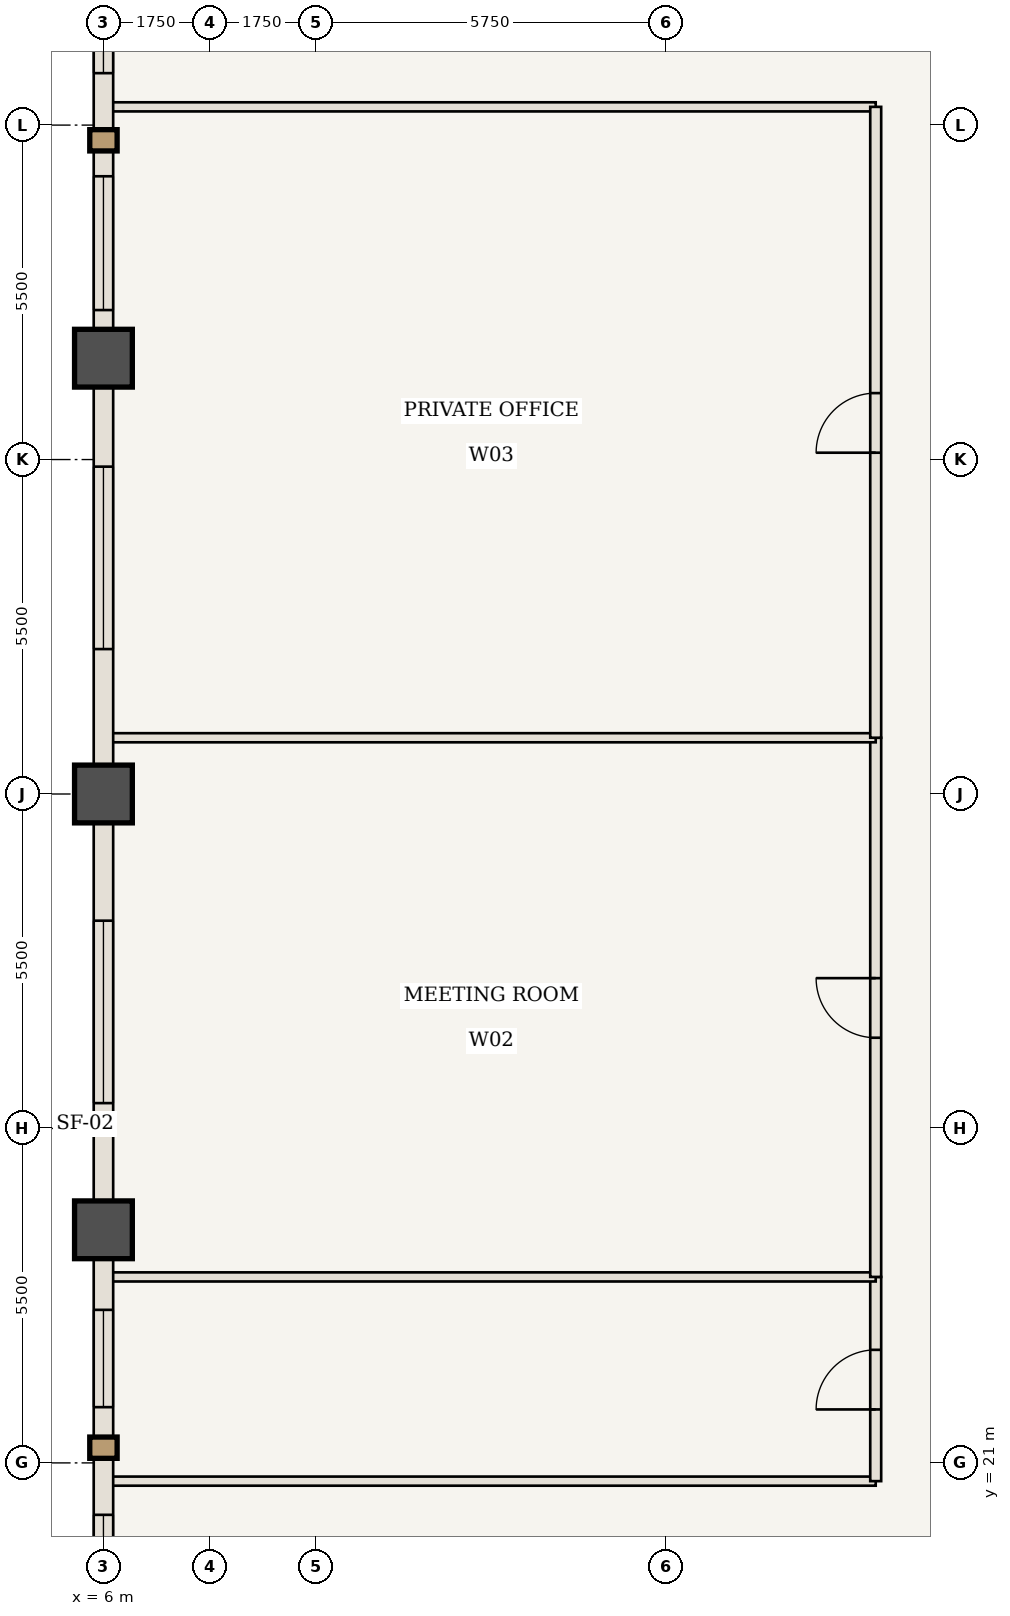
"""IFC4 building model, lengths in metres.
Left out: names, types, materials, properties, quantities, classifications, styles, units other than length and angle.
Written with IfcOpenShell. Run it as: python <this file> out.ifc"""

import sys

from ifc_helpers import new_model, si_unit, direction, frame, frame_2d, origin, origin_2d, place, context, subcontext, project, spatial, rectangle, extrude, element, fill, save


model = new_model("IFC4")
c1 = context("Model", 3, precision=1e-05, world=origin(), true_north=direction((0.0, 1.0)))
c2 = subcontext(c1, "Body", "Model", "MODEL_VIEW")
j1 = project(units=[si_unit("LENGTHUNIT", "METRE"), si_unit("PLANEANGLEUNIT", "RADIAN")], contexts=[c1])
p1 = place(None, origin())
s1 = spatial("IfcSite", under=j1, at=p1, CompositionType="ELEMENT")
p2 = place(p1, origin())
s2 = spatial("IfcBuilding", under=s1, at=p2, CompositionType="ELEMENT")
p3 = place(p2, frame((0.0, 0.0, 141.4)))
s3 = spatial("IfcBuildingStorey", under=s2, at=p3, CompositionType="ELEMENT", Elevation=141.4)
for number, where, z_axis, x_axis in (
    (1, (6.0, 24.833, 0.0), (0.0, 0.0, 1.0), (1.0, 0.0, 0.0)),
    (2, (6.0, 32.0, 0.0), (0.0, 0.0, 1.0), (1.0, 0.0, 0.0)),
    (3, (6.0, 39.167, 0.0), (0.0, 0.0, 1.0), (1.0, 0.0, 0.0)),
):
    element("IfcColumn", number, at=place(p3, frame(where, z_axis=z_axis, x_axis=x_axis)), inside=s3, PredefinedType="COLUMN", context=c2, shape_type="SweptSolid", body=[
        extrude(rectangle(XDim=0.95, YDim=0.95, at=origin_2d()), origin(), (0.0, 0.0, 1.0), 3.85),
    ])
for number, where, z_axis, x_axis in (
    (4, (6.06, 20.7, 0.0), (0.0, 0.0, 1.0), (1.0, 0.0, 0.0)),
    (5, (6.06, 43.3, 0.0), (0.0, 0.0, 1.0), (1.0, 0.0, 0.0)),
):
    element("IfcWall", number, at=place(p3, frame(where, z_axis=z_axis, x_axis=x_axis)), inside=s3, PredefinedType="STANDARD", context=c2, shape_type="SweptSolid", body=[
        extrude(rectangle(XDim=12.64, YDim=0.15, at=frame_2d((6.32, 0.0))), origin(), (0.0, 0.0, 1.0), 3.065),
    ])
p4 = place(p3, frame((18.7, 20.7, 0.0), z_axis=(0.0, 0.0, 1.0), x_axis=(0.0, 1.0, 0.0)))
e6 = element("IfcWall", 6, at=p4, inside=s3, PredefinedType="STANDARD", context=c2, shape_type="SweptSolid", body=[
    extrude(rectangle(XDim=3.358, YDim=0.18, at=frame_2d((1.679, 0.0))), origin(), (0.0, 0.0, 1.0), 3.685),
])
p5 = place(p4, frame((1.179, 0.0, 0.0)))
e7 = element("IfcOpeningElement", 7, at=p5, cuts=e6, PredefinedType="OPENING", context=c2, shape_type="SweptSolid", body=[
    extrude(rectangle(XDim=0.98, YDim=2.2, at=frame_2d((0.49, 1.1))), frame((0.0, 0.1, 0.0), z_axis=(0.0, -1.0, 0.0), x_axis=(1.0, 0.0, 0.0)), (0.0, 0.0, 1.0), 0.2),
])
p6 = place(p3, frame((6.06, 24.058, 0.0), z_axis=(0.0, 0.0, 1.0), x_axis=(1.0, 0.0, 0.0)))
e8 = element("IfcWall", 8, at=p6, inside=s3, PredefinedType="STANDARD", context=c2, shape_type="SweptSolid", body=[
    extrude(rectangle(XDim=12.64, YDim=0.15, at=frame_2d((6.32, 0.0))), origin(), (0.0, 0.0, 1.0), 3.685),
])
p7 = place(p3, frame((18.7, 24.058, 0.0), z_axis=(0.0, 0.0, 1.0), x_axis=(0.0, 1.0, 0.0)))
e9 = element("IfcWall", 9, at=p7, inside=s3, PredefinedType="STANDARD", context=c2, shape_type="SweptSolid", body=[
    extrude(rectangle(XDim=8.867, YDim=0.18, at=frame_2d((4.433, 0.0))), origin(), (0.0, 0.0, 1.0), 3.685),
])
p8 = place(p7, frame((3.933, 0.0, 0.0)))
e10 = element("IfcOpeningElement", 10, at=p8, cuts=e9, PredefinedType="OPENING", context=c2, shape_type="SweptSolid", body=[
    extrude(rectangle(XDim=0.98, YDim=2.2, at=frame_2d((0.49, 1.1))), frame((0.0, 0.1, 0.0), z_axis=(0.0, -1.0, 0.0), x_axis=(1.0, 0.0, 0.0)), (0.0, 0.0, 1.0), 0.2),
])
p9 = place(p3, frame((6.06, 32.925, 0.0), z_axis=(0.0, 0.0, 1.0), x_axis=(1.0, 0.0, 0.0)))
e11 = element("IfcWall", 11, at=p9, inside=s3, PredefinedType="STANDARD", context=c2, shape_type="SweptSolid", body=[
    extrude(rectangle(XDim=12.64, YDim=0.15, at=frame_2d((6.32, 0.0))), origin(), (0.0, 0.0, 1.0), 3.685),
])
p10 = place(p3, frame((18.7, 32.925, 0.0), z_axis=(0.0, 0.0, 1.0), x_axis=(0.0, 1.0, 0.0)))
e12 = element("IfcWall", 12, at=p10, inside=s3, PredefinedType="STANDARD", context=c2, shape_type="SweptSolid", body=[
    extrude(rectangle(XDim=10.375, YDim=0.18, at=frame_2d((5.188, 0.0))), origin(), (0.0, 0.0, 1.0), 3.685),
])
p11 = place(p10, frame((4.688, 0.0, 0.0)))
e13 = element("IfcOpeningElement", 13, at=p11, cuts=e12, PredefinedType="OPENING", context=c2, shape_type="SweptSolid", body=[
    extrude(rectangle(XDim=0.98, YDim=2.2, at=frame_2d((0.49, 1.1))), frame((0.0, 0.1, 0.0), z_axis=(0.0, -1.0, 0.0), x_axis=(1.0, 0.0, 0.0)), (0.0, 0.0, 1.0), 0.2),
])
p12 = place(p3, frame((6.0, 17.667, 0.0), z_axis=(0.0, 0.0, 1.0), x_axis=(0.0, 1.0, 0.0)))
e14 = element("IfcWall", 14, at=p12, inside=s3, PredefinedType="USERDEFINED", context=c2, shape_type="SweptSolid", body=[
    extrude(rectangle(XDim=7.167, YDim=0.32, at=frame_2d((3.583, 0.0))), origin(), (0.0, 0.0, 1.0), 2.885),
])
p13 = place(p12, frame((0.879, 0.0, 0.85)))
e15 = element("IfcOpeningElement", 15, at=p13, cuts=e14, PredefinedType="OPENING", context=c2, shape_type="SweptSolid", body=[
    extrude(rectangle(XDim=1.6, YDim=1.835, at=frame_2d((0.8, 0.917))), frame((0.0, 0.17, 0.0), z_axis=(0.0, -1.0, 0.0), x_axis=(1.0, 0.0, 0.0)), (0.0, 0.0, 1.0), 0.34),
])
p14 = place(p12, frame((4.25, 0.0, 0.85)))
e16 = element("IfcOpeningElement", 16, at=p14, cuts=e14, PredefinedType="OPENING", context=c2, shape_type="SweptSolid", body=[
    extrude(rectangle(XDim=1.6, YDim=1.835, at=frame_2d((0.8, 0.917))), frame((0.0, 0.17, 0.0), z_axis=(0.0, -1.0, 0.0), x_axis=(1.0, 0.0, 0.0)), (0.0, 0.0, 1.0), 0.34),
])
p15 = place(p3, frame((6.0, 24.833, 0.0), z_axis=(0.0, 0.0, 1.0), x_axis=(0.0, 1.0, 0.0)))
e17 = element("IfcWall", 17, at=p15, inside=s3, PredefinedType="USERDEFINED", context=c2, shape_type="SweptSolid", body=[
    extrude(rectangle(XDim=7.167, YDim=0.32, at=frame_2d((3.583, 0.0))), origin(), (0.0, 0.0, 1.0), 2.885),
])
p16 = place(p15, frame((2.083, 0.0, 0.85)))
e18 = element("IfcOpeningElement", 18, at=p16, cuts=e17, PredefinedType="OPENING", context=c2, shape_type="SweptSolid", body=[
    extrude(rectangle(XDim=3.0, YDim=1.835, at=frame_2d((1.5, 0.917))), frame((0.0, 0.17, 0.0), z_axis=(0.0, -1.0, 0.0), x_axis=(1.0, 0.0, 0.0)), (0.0, 0.0, 1.0), 0.34),
])
p17 = place(p3, frame((6.0, 32.0, 0.0), z_axis=(0.0, 0.0, 1.0), x_axis=(0.0, 1.0, 0.0)))
e19 = element("IfcWall", 19, at=p17, inside=s3, PredefinedType="USERDEFINED", context=c2, shape_type="SweptSolid", body=[
    extrude(rectangle(XDim=7.167, YDim=0.32, at=frame_2d((3.583, 0.0))), origin(), (0.0, 0.0, 1.0), 2.885),
])
p18 = place(p17, frame((2.383, 0.0, 0.85)))
e20 = element("IfcOpeningElement", 20, at=p18, cuts=e19, PredefinedType="OPENING", context=c2, shape_type="SweptSolid", body=[
    extrude(rectangle(XDim=3.0, YDim=1.835, at=frame_2d((1.5, 0.917))), frame((0.0, 0.17, 0.0), z_axis=(0.0, -1.0, 0.0), x_axis=(1.0, 0.0, 0.0)), (0.0, 0.0, 1.0), 0.34),
])
p19 = place(p3, frame((6.0, 39.167, 0.0), z_axis=(0.0, 0.0, 1.0), x_axis=(0.0, 1.0, 0.0)))
e21 = element("IfcWall", 21, at=p19, inside=s3, PredefinedType="USERDEFINED", context=c2, shape_type="SweptSolid", body=[
    extrude(rectangle(XDim=7.167, YDim=0.32, at=frame_2d((3.583, 0.0))), origin(), (0.0, 0.0, 1.0), 2.885),
])
p20 = place(p19, frame((0.792, 0.0, 0.85)))
e22 = element("IfcOpeningElement", 22, at=p20, cuts=e21, PredefinedType="OPENING", context=c2, shape_type="SweptSolid", body=[
    extrude(rectangle(XDim=2.2, YDim=1.835, at=frame_2d((1.1, 0.917))), frame((0.0, 0.17, 0.0), z_axis=(0.0, -1.0, 0.0), x_axis=(1.0, 0.0, 0.0)), (0.0, 0.0, 1.0), 0.34),
])
p21 = place(p19, frame((4.688, 0.0, 0.85)))
e23 = element("IfcOpeningElement", 23, at=p21, cuts=e21, PredefinedType="OPENING", context=c2, shape_type="SweptSolid", body=[
    extrude(rectangle(XDim=1.6, YDim=1.835, at=frame_2d((0.8, 0.917))), frame((0.0, 0.17, 0.0), z_axis=(0.0, -1.0, 0.0), x_axis=(1.0, 0.0, 0.0)), (0.0, 0.0, 1.0), 0.34),
])
p22 = place(p5, origin())
e24 = element("IfcDoor", 24, at=p22, inside=s3, OperationType="SINGLE_SWING_LEFT", PredefinedType="DOOR", context=c2, shape_type="SweptSolid", body=[
    extrude(rectangle(XDim=0.98, YDim=2.2, at=frame_2d((0.49, 1.1))), frame((0.0, 0.025, 0.0), z_axis=(0.0, -1.0, 0.0), x_axis=(1.0, 0.0, 0.0)), (0.0, 0.0, 1.0), 0.05),
])
fill(e7, e24)
p23 = place(p8, origin())
e25 = element("IfcDoor", 25, at=p23, inside=s3, OperationType="SINGLE_SWING_RIGHT", PredefinedType="DOOR", context=c2, shape_type="SweptSolid", body=[
    extrude(rectangle(XDim=0.98, YDim=2.2, at=frame_2d((0.49, 1.1))), frame((0.0, 0.025, 0.0), z_axis=(0.0, -1.0, 0.0), x_axis=(1.0, 0.0, 0.0)), (0.0, 0.0, 1.0), 0.05),
])
fill(e10, e25)
p24 = place(p11, origin())
e26 = element("IfcDoor", 26, at=p24, inside=s3, OperationType="SINGLE_SWING_LEFT", PredefinedType="DOOR", context=c2, shape_type="SweptSolid", body=[
    extrude(rectangle(XDim=0.98, YDim=2.2, at=frame_2d((0.49, 1.1))), frame((0.0, 0.025, 0.0), z_axis=(0.0, -1.0, 0.0), x_axis=(1.0, 0.0, 0.0)), (0.0, 0.0, 1.0), 0.05),
])
fill(e13, e26)
p25 = place(p13, origin())
e27 = element("IfcWindow", 27, at=p25, inside=s3, PartitioningType="SINGLE_PANEL", PredefinedType="WINDOW", context=c2, shape_type="SweptSolid", body=[
    extrude(rectangle(XDim=1.6, YDim=1.835, at=frame_2d((0.8, 0.917))), frame((0.0, 0.03, 0.0), z_axis=(0.0, -1.0, 0.0), x_axis=(1.0, 0.0, 0.0)), (0.0, 0.0, 1.0), 0.06),
])
fill(e15, e27)
p26 = place(p14, origin())
e28 = element("IfcWindow", 28, at=p26, inside=s3, PartitioningType="SINGLE_PANEL", PredefinedType="WINDOW", context=c2, shape_type="SweptSolid", body=[
    extrude(rectangle(XDim=1.6, YDim=1.835, at=frame_2d((0.8, 0.917))), frame((0.0, 0.03, 0.0), z_axis=(0.0, -1.0, 0.0), x_axis=(1.0, 0.0, 0.0)), (0.0, 0.0, 1.0), 0.06),
])
fill(e16, e28)
p27 = place(p16, origin())
e29 = element("IfcWindow", 29, at=p27, inside=s3, PartitioningType="SINGLE_PANEL", PredefinedType="WINDOW", context=c2, shape_type="SweptSolid", body=[
    extrude(rectangle(XDim=3.0, YDim=1.835, at=frame_2d((1.5, 0.917))), frame((0.0, 0.03, 0.0), z_axis=(0.0, -1.0, 0.0), x_axis=(1.0, 0.0, 0.0)), (0.0, 0.0, 1.0), 0.06),
])
fill(e18, e29)
p28 = place(p18, origin())
e30 = element("IfcWindow", 30, at=p28, inside=s3, PartitioningType="SINGLE_PANEL", PredefinedType="WINDOW", context=c2, shape_type="SweptSolid", body=[
    extrude(rectangle(XDim=3.0, YDim=1.835, at=frame_2d((1.5, 0.917))), frame((0.0, 0.03, 0.0), z_axis=(0.0, -1.0, 0.0), x_axis=(1.0, 0.0, 0.0)), (0.0, 0.0, 1.0), 0.06),
])
fill(e20, e30)
p29 = place(p20, origin())
e31 = element("IfcWindow", 31, at=p29, inside=s3, PartitioningType="SINGLE_PANEL", PredefinedType="WINDOW", context=c2, shape_type="SweptSolid", body=[
    extrude(rectangle(XDim=2.2, YDim=1.835, at=frame_2d((1.1, 0.917))), frame((0.0, 0.03, 0.0), z_axis=(0.0, -1.0, 0.0), x_axis=(1.0, 0.0, 0.0)), (0.0, 0.0, 1.0), 0.06),
])
fill(e22, e31)
p30 = place(p21, origin())
e32 = element("IfcWindow", 32, at=p30, inside=s3, PartitioningType="SINGLE_PANEL", PredefinedType="WINDOW", context=c2, shape_type="SweptSolid", body=[
    extrude(rectangle(XDim=1.6, YDim=1.835, at=frame_2d((0.8, 0.917))), frame((0.0, 0.03, 0.0), z_axis=(0.0, -1.0, 0.0), x_axis=(1.0, 0.0, 0.0)), (0.0, 0.0, 1.0), 0.06),
])
fill(e23, e32)
save(model, sys.argv[1])
